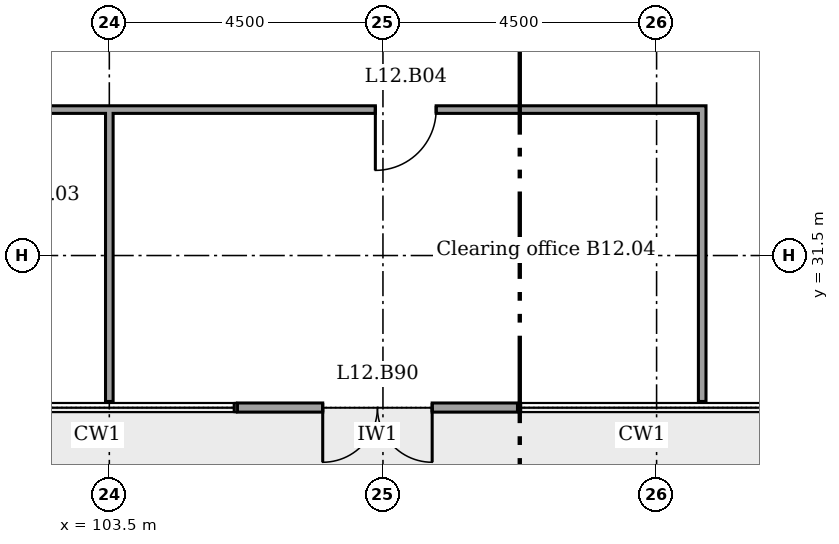
"""IFC4 building model, lengths in metres.
Left out: names, types, materials, properties, quantities, classifications, styles, units other than length and angle.
Written with IfcOpenShell. Run it as: python <this file> out.ifc"""

import sys

from ifc_helpers import new_model, si_unit, direction, frame, frame_2d, origin, place, context, subcontext, project, spatial, rectangle, extrude, element, fill, save


model = new_model("IFC4")
c1 = context("Model", 3, precision=1e-05, world=origin(), true_north=direction((0.0, 1.0)))
c2 = subcontext(c1, "Body", "Model", "MODEL_VIEW")
j1 = project(units=[si_unit("LENGTHUNIT", "METRE"), si_unit("PLANEANGLEUNIT", "RADIAN")], contexts=[c1])
p1 = place(None, origin())
s1 = spatial("IfcSite", under=j1, at=p1, CompositionType="ELEMENT")
p2 = place(p1, origin())
s2 = spatial("IfcBuilding", under=s1, at=p2, CompositionType="ELEMENT")
p3 = place(p2, frame((0.0, 0.0, 54.6)))
s3 = spatial("IfcBuildingStorey", under=s2, at=p3, CompositionType="ELEMENT", Elevation=54.6)
p4 = place(p3, frame((105.606, 29.0, 0.0)))
e1 = element("IfcWall", 1, at=p4, inside=s3, PredefinedType="SOLIDWALL", context=c2, shape_type="SweptSolid", body=[
    extrude(rectangle(XDim=4.606, YDim=0.15, at=frame_2d((2.303, 0.0))), origin(), (0.0, 0.0, 1.0), 3.45),
])
p5 = place(p4, frame((1.403, 0.0, 0.0)))
e2 = element("IfcOpeningElement", 2, at=p5, cuts=e1, PredefinedType="OPENING", context=c2, shape_type="SweptSolid", body=[
    extrude(rectangle(XDim=1.8, YDim=2.4, at=frame_2d((0.9, 1.2))), frame((0.0, 0.085, 0.0), z_axis=(0.0, -1.0, 0.0), x_axis=(1.0, 0.0, 0.0)), (0.0, 0.0, 1.0), 0.17),
])
p6 = place(p3, frame((100.738, 33.9, 0.0)))
e3 = element("IfcWall", 3, at=p6, inside=s3, PredefinedType="PARTITIONING", context=c2, shape_type="SweptSolid", body=[
    extrude(rectangle(XDim=12.575, YDim=0.125, at=frame_2d((6.288, 0.0))), origin(), (0.0, 0.0, 1.0), 3.45),
])
p7 = place(p6, frame((7.137, 0.0, 0.0)))
e4 = element("IfcOpeningElement", 4, at=p7, cuts=e3, PredefinedType="OPENING", context=c2, shape_type="SweptSolid", body=[
    extrude(rectangle(XDim=1.0, YDim=2.1, at=frame_2d((0.5, 1.05))), frame((0.0, 0.073, 0.0), z_axis=(0.0, -1.0, 0.0), x_axis=(1.0, 0.0, 0.0)), (0.0, 0.0, 1.0), 0.145),
])
p8 = place(p3, frame((103.5, 29.1, 0.0), z_axis=(0.0, 0.0, 1.0), x_axis=(0.0, 1.0, 0.0)))
e5 = element("IfcWall", 5, at=p8, inside=s3, PredefinedType="PARTITIONING", context=c2, shape_type="SweptSolid", body=[
    extrude(rectangle(XDim=4.8, YDim=0.125, at=frame_2d((2.4, 0.0))), origin(), (0.0, 0.0, 1.0), 2.851),
])
p9 = place(p3, frame((113.25, 29.1, 0.0), z_axis=(0.0, 0.0, 1.0), x_axis=(0.0, 1.0, 0.0)))
e6 = element("IfcWall", 6, at=p9, inside=s3, PredefinedType="PARTITIONING", context=c2, shape_type="SweptSolid", body=[
    extrude(rectangle(XDim=4.737, YDim=0.125, at=frame_2d((2.369, 0.0))), origin(), (0.0, 0.0, 1.0), 3.45),
])
p10 = place(p5, frame((1.8, 0.0, 0.0), x_axis=(-1.0, 0.0, 0.0)))
e7 = element("IfcDoor", 7, at=p10, inside=s3, OperationType="DOUBLE_DOOR_DOUBLE_SWING", PredefinedType="NOTDEFINED", context=c2, shape_type="SweptSolid", body=[
    extrude(rectangle(XDim=1.8, YDim=2.4, at=frame_2d((0.9, 1.2))), frame((0.0, 0.025, 0.0), z_axis=(0.0, -1.0, 0.0), x_axis=(1.0, 0.0, 0.0)), (0.0, 0.0, 1.0), 0.05),
])
fill(e2, e7)
p11 = place(p7, frame((1.0, 0.0, 0.0), x_axis=(-1.0, 0.0, 0.0)))
e8 = element("IfcDoor", 8, at=p11, inside=s3, OperationType="SINGLE_SWING_LEFT", PredefinedType="DOOR", context=c2, shape_type="SweptSolid", body=[
    extrude(rectangle(XDim=1.0, YDim=2.1, at=frame_2d((0.5, 1.05))), frame((0.0, 0.025, 0.0), z_axis=(0.0, -1.0, 0.0), x_axis=(1.0, 0.0, 0.0)), (0.0, 0.0, 1.0), 0.05),
])
fill(e4, e8)
save(model, sys.argv[1])
